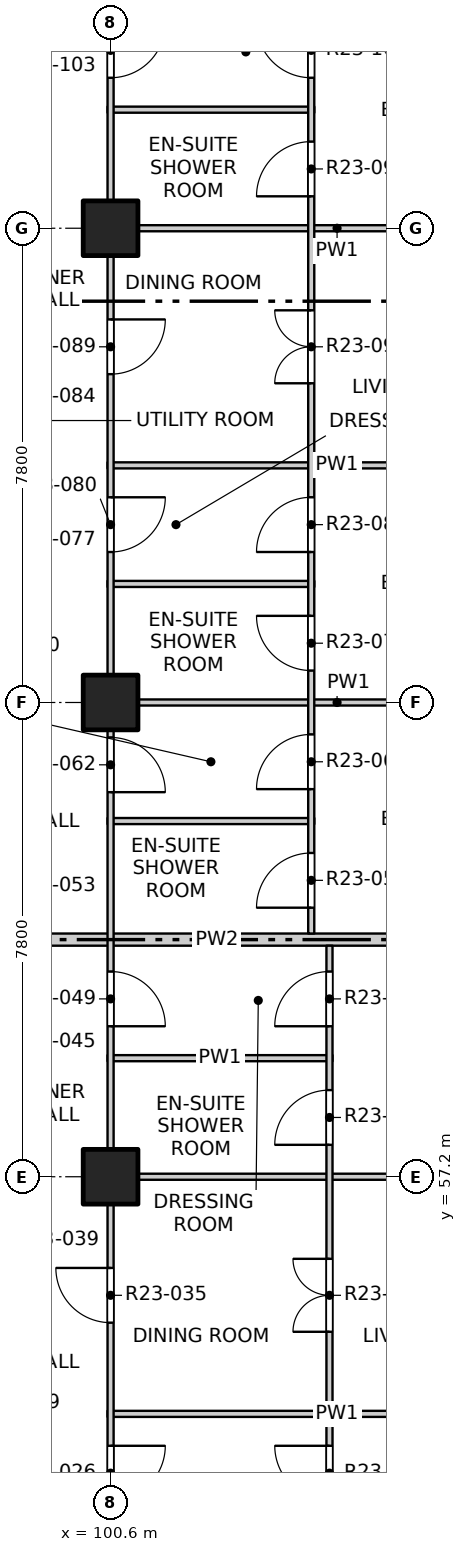
"""IFC4 building model, lengths in metres.
Left out: names, types, materials, properties, quantities, classifications, styles, units other than length and angle.
Written with IfcOpenShell. Run it as: python <this file> out.ifc"""

import sys

from ifc_helpers import new_model, si_unit, direction, frame, frame_2d, origin, origin_2d, place, context, subcontext, project, spatial, rectangle, extrude, element, fill, save


model = new_model("IFC4")
c1 = context("Model", 3, precision=1e-05, world=origin(), true_north=direction((0.0, 1.0)))
c2 = subcontext(c1, "Body", "Model", "MODEL_VIEW")
j1 = project(units=[si_unit("LENGTHUNIT", "METRE"), si_unit("PLANEANGLEUNIT", "RADIAN")], contexts=[c1])
p1 = place(None, origin())
s1 = spatial("IfcSite", under=j1, at=p1, CompositionType="ELEMENT")
p2 = place(p1, origin())
s2 = spatial("IfcBuilding", under=s1, at=p2, CompositionType="ELEMENT")
p3 = place(p2, frame((0.0, 0.0, 238.1)))
s3 = spatial("IfcBuildingStorey", under=s2, at=p3, CompositionType="ELEMENT", Elevation=238.1)
for number, where, z_axis, x_axis in (
    (1, (100.6, 57.2, -0.25), (0.0, 0.0, 1.0), (1.0, 0.0, 0.0)),
    (2, (100.6, 65.0, -0.25), (0.0, 0.0, 1.0), (1.0, 0.0, 0.0)),
    (3, (100.6, 72.8, -0.25), (0.0, 0.0, 1.0), (1.0, 0.0, 0.0)),
):
    element("IfcColumn", number, at=place(p3, frame(where, z_axis=z_axis, x_axis=x_axis)), inside=s3, PredefinedType="COLUMN", context=c2, shape_type="SweptSolid", body=[
        extrude(rectangle(XDim=0.9, YDim=0.9, at=origin_2d()), origin(), (0.0, 0.0, 1.0), 3.35),
    ])
for number, where, z_axis, x_axis in (
    (4, (100.55, 53.3, 0.0), (0.0, 0.0, 1.0), (1.0, 0.0, 0.0)),
    (5, (100.55, 57.2, 0.0), (0.0, 0.0, 1.0), (1.0, 0.0, 0.0)),
):
    element("IfcWall", number, at=place(p3, frame(where, z_axis=z_axis, x_axis=x_axis)), inside=s3, PredefinedType="PARTITIONING", context=c2, shape_type="SweptSolid", body=[
        extrude(rectangle(XDim=7.55, YDim=0.1, at=frame_2d((3.775, 0.0))), origin(), (0.0, 0.0, 1.0), 3.1),
    ])
p4 = place(p3, frame((100.55, 59.15, 0.0), z_axis=(0.0, 0.0, 1.0), x_axis=(1.0, 0.0, 0.0)))
e6 = element("IfcWall", 6, at=p4, inside=s3, PredefinedType="PARTITIONING", context=c2, shape_type="SweptSolid", body=[
    extrude(rectangle(XDim=3.7, YDim=0.1, at=frame_2d((1.85, 0.0))), origin(), (0.0, 0.0, 1.0), 3.1),
])
p5 = place(p3, frame((96.6, 61.1, 0.0), z_axis=(0.0, 0.0, 1.0), x_axis=(1.0, 0.0, 0.0)))
e7 = element("IfcWall", 7, at=p5, inside=s3, PredefinedType="PARTITIONING", context=c2, shape_type="SweptSolid", body=[
    extrude(rectangle(XDim=11.5, YDim=0.2, at=frame_2d((5.75, 0.0))), origin(), (0.0, 0.0, 1.0), 3.1),
])
p6 = place(p3, frame((100.55, 63.05, 0.0), z_axis=(0.0, 0.0, 1.0), x_axis=(1.0, 0.0, 0.0)))
e8 = element("IfcWall", 8, at=p6, inside=s3, PredefinedType="PARTITIONING", context=c2, shape_type="SweptSolid", body=[
    extrude(rectangle(XDim=3.4, YDim=0.1, at=frame_2d((1.7, 0.0))), origin(), (0.0, 0.0, 1.0), 3.1),
])
p7 = place(p3, frame((100.55, 65.0, 0.0), z_axis=(0.0, 0.0, 1.0), x_axis=(1.0, 0.0, 0.0)))
e9 = element("IfcWall", 9, at=p7, inside=s3, PredefinedType="PARTITIONING", context=c2, shape_type="SweptSolid", body=[
    extrude(rectangle(XDim=7.55, YDim=0.1, at=frame_2d((3.775, 0.0))), origin(), (0.0, 0.0, 1.0), 3.1),
])
p8 = place(p3, frame((100.55, 66.95, 0.0), z_axis=(0.0, 0.0, 1.0), x_axis=(1.0, 0.0, 0.0)))
e10 = element("IfcWall", 10, at=p8, inside=s3, PredefinedType="PARTITIONING", context=c2, shape_type="SweptSolid", body=[
    extrude(rectangle(XDim=3.4, YDim=0.1, at=frame_2d((1.7, 0.0))), origin(), (0.0, 0.0, 1.0), 3.1),
])
for number, where, z_axis, x_axis in (
    (11, (100.55, 68.9, 0.0), (0.0, 0.0, 1.0), (1.0, 0.0, 0.0)),
    (12, (100.55, 72.8, 0.0), (0.0, 0.0, 1.0), (1.0, 0.0, 0.0)),
):
    element("IfcWall", number, at=place(p3, frame(where, z_axis=z_axis, x_axis=x_axis)), inside=s3, PredefinedType="PARTITIONING", context=c2, shape_type="SweptSolid", body=[
        extrude(rectangle(XDim=7.55, YDim=0.1, at=frame_2d((3.775, 0.0))), origin(), (0.0, 0.0, 1.0), 3.1),
    ])
p9 = place(p3, frame((100.55, 74.75, 0.0), z_axis=(0.0, 0.0, 1.0), x_axis=(1.0, 0.0, 0.0)))
e13 = element("IfcWall", 13, at=p9, inside=s3, PredefinedType="PARTITIONING", context=c2, shape_type="SweptSolid", body=[
    extrude(rectangle(XDim=3.4, YDim=0.1, at=frame_2d((1.7, 0.0))), origin(), (0.0, 0.0, 1.0), 3.1),
])
p10 = place(p3, frame((100.6, 41.9, 0.0), z_axis=(0.0, 0.0, 1.0), x_axis=(0.0, 1.0, 0.0)))
e14 = element("IfcWall", 14, at=p10, inside=s3, PredefinedType="PARTITIONING", context=c2, shape_type="SweptSolid", body=[
    extrude(rectangle(XDim=46.2, YDim=0.1, at=frame_2d((23.1, 0.0))), origin(), (0.0, 0.0, 1.0), 3.1),
])
p11 = place(p10, frame((1.2, 0.0, 0.0)))
e15 = element("IfcOpeningElement", 15, at=p11, cuts=e14, PredefinedType="OPENING", context=c2, shape_type="SweptSolid", body=[
    extrude(rectangle(XDim=0.9, YDim=2.1, at=frame_2d((0.45, 1.05))), frame((0.0, 0.06, 0.0), z_axis=(0.0, -1.0, 0.0), x_axis=(1.0, 0.0, 0.0)), (0.0, 0.0, 1.0), 0.12),
])
p12 = place(p10, frame((6.025, 0.0, 0.0)))
e16 = element("IfcOpeningElement", 16, at=p12, cuts=e14, PredefinedType="OPENING", context=c2, shape_type="SweptSolid", body=[
    extrude(rectangle(XDim=0.9, YDim=2.1, at=frame_2d((0.45, 1.05))), frame((0.0, 0.06, 0.0), z_axis=(0.0, -1.0, 0.0), x_axis=(1.0, 0.0, 0.0)), (0.0, 0.0, 1.0), 0.12),
])
p13 = place(p10, frame((9.975, 0.0, 0.0)))
e17 = element("IfcOpeningElement", 17, at=p13, cuts=e14, PredefinedType="OPENING", context=c2, shape_type="SweptSolid", body=[
    extrude(rectangle(XDim=0.9, YDim=2.1, at=frame_2d((0.45, 1.05))), frame((0.0, 0.06, 0.0), z_axis=(0.0, -1.0, 0.0), x_axis=(1.0, 0.0, 0.0)), (0.0, 0.0, 1.0), 0.12),
])
p14 = place(p10, frame((12.9, 0.0, 0.0)))
e18 = element("IfcOpeningElement", 18, at=p14, cuts=e14, PredefinedType="OPENING", context=c2, shape_type="SweptSolid", body=[
    extrude(rectangle(XDim=0.9, YDim=2.1, at=frame_2d((0.45, 1.05))), frame((0.0, 0.06, 0.0), z_axis=(0.0, -1.0, 0.0), x_axis=(1.0, 0.0, 0.0)), (0.0, 0.0, 1.0), 0.12),
])
p15 = place(p10, frame((17.775, 0.0, 0.0)))
e19 = element("IfcOpeningElement", 19, at=p15, cuts=e14, PredefinedType="OPENING", context=c2, shape_type="SweptSolid", body=[
    extrude(rectangle(XDim=0.9, YDim=2.1, at=frame_2d((0.45, 1.05))), frame((0.0, 0.06, 0.0), z_axis=(0.0, -1.0, 0.0), x_axis=(1.0, 0.0, 0.0)), (0.0, 0.0, 1.0), 0.12),
])
p16 = place(p10, frame((21.625, 0.0, 0.0)))
e20 = element("IfcOpeningElement", 20, at=p16, cuts=e14, PredefinedType="OPENING", context=c2, shape_type="SweptSolid", body=[
    extrude(rectangle(XDim=0.9, YDim=2.1, at=frame_2d((0.45, 1.05))), frame((0.0, 0.06, 0.0), z_axis=(0.0, -1.0, 0.0), x_axis=(1.0, 0.0, 0.0)), (0.0, 0.0, 1.0), 0.12),
])
p17 = place(p10, frame((25.575, 0.0, 0.0)))
e21 = element("IfcOpeningElement", 21, at=p17, cuts=e14, PredefinedType="OPENING", context=c2, shape_type="SweptSolid", body=[
    extrude(rectangle(XDim=0.9, YDim=2.1, at=frame_2d((0.45, 1.05))), frame((0.0, 0.06, 0.0), z_axis=(0.0, -1.0, 0.0), x_axis=(1.0, 0.0, 0.0)), (0.0, 0.0, 1.0), 0.12),
])
p18 = place(p10, frame((28.5, 0.0, 0.0)))
e22 = element("IfcOpeningElement", 22, at=p18, cuts=e14, PredefinedType="OPENING", context=c2, shape_type="SweptSolid", body=[
    extrude(rectangle(XDim=0.9, YDim=2.1, at=frame_2d((0.45, 1.05))), frame((0.0, 0.06, 0.0), z_axis=(0.0, -1.0, 0.0), x_axis=(1.0, 0.0, 0.0)), (0.0, 0.0, 1.0), 0.12),
])
p19 = place(p10, frame((33.375, 0.0, 0.0)))
e23 = element("IfcOpeningElement", 23, at=p19, cuts=e14, PredefinedType="OPENING", context=c2, shape_type="SweptSolid", body=[
    extrude(rectangle(XDim=0.9, YDim=2.1, at=frame_2d((0.45, 1.05))), frame((0.0, 0.06, 0.0), z_axis=(0.0, -1.0, 0.0), x_axis=(1.0, 0.0, 0.0)), (0.0, 0.0, 1.0), 0.12),
])
p20 = place(p10, frame((36.3, 0.0, 0.0)))
e24 = element("IfcOpeningElement", 24, at=p20, cuts=e14, PredefinedType="OPENING", context=c2, shape_type="SweptSolid", body=[
    extrude(rectangle(XDim=0.9, YDim=2.1, at=frame_2d((0.45, 1.05))), frame((0.0, 0.06, 0.0), z_axis=(0.0, -1.0, 0.0), x_axis=(1.0, 0.0, 0.0)), (0.0, 0.0, 1.0), 0.12),
])
p21 = place(p10, frame((40.2, 0.0, 0.0)))
e25 = element("IfcOpeningElement", 25, at=p21, cuts=e14, PredefinedType="OPENING", context=c2, shape_type="SweptSolid", body=[
    extrude(rectangle(XDim=0.9, YDim=2.1, at=frame_2d((0.45, 1.05))), frame((0.0, 0.06, 0.0), z_axis=(0.0, -1.0, 0.0), x_axis=(1.0, 0.0, 0.0)), (0.0, 0.0, 1.0), 0.12),
])
p22 = place(p10, frame((44.1, 0.0, 0.0)))
e26 = element("IfcOpeningElement", 26, at=p22, cuts=e14, PredefinedType="OPENING", context=c2, shape_type="SweptSolid", body=[
    extrude(rectangle(XDim=0.9, YDim=2.1, at=frame_2d((0.45, 1.05))), frame((0.0, 0.06, 0.0), z_axis=(0.0, -1.0, 0.0), x_axis=(1.0, 0.0, 0.0)), (0.0, 0.0, 1.0), 0.12),
])
p23 = place(p3, frame((103.9, 61.2, 0.0), z_axis=(0.0, 0.0, 1.0), x_axis=(0.0, 1.0, 0.0)))
e27 = element("IfcWall", 27, at=p23, inside=s3, PredefinedType="PARTITIONING", context=c2, shape_type="SweptSolid", body=[
    extrude(rectangle(XDim=26.9, YDim=0.1, at=frame_2d((13.45, 0.0))), origin(), (0.0, 0.0, 1.0), 3.1),
])
p24 = place(p23, frame((0.425, 0.0, 0.0)))
e28 = element("IfcOpeningElement", 28, at=p24, cuts=e27, PredefinedType="OPENING", context=c2, shape_type="SweptSolid", body=[
    extrude(rectangle(XDim=0.9, YDim=2.1, at=frame_2d((0.45, 1.05))), frame((0.0, 0.06, 0.0), z_axis=(0.0, -1.0, 0.0), x_axis=(1.0, 0.0, 0.0)), (0.0, 0.0, 1.0), 0.12),
])
p25 = place(p23, frame((2.375, 0.0, 0.0)))
e29 = element("IfcOpeningElement", 29, at=p25, cuts=e27, PredefinedType="OPENING", context=c2, shape_type="SweptSolid", body=[
    extrude(rectangle(XDim=0.9, YDim=2.1, at=frame_2d((0.45, 1.05))), frame((0.0, 0.06, 0.0), z_axis=(0.0, -1.0, 0.0), x_axis=(1.0, 0.0, 0.0)), (0.0, 0.0, 1.0), 0.12),
])
p26 = place(p23, frame((4.325, 0.0, 0.0)))
e30 = element("IfcOpeningElement", 30, at=p26, cuts=e27, PredefinedType="OPENING", context=c2, shape_type="SweptSolid", body=[
    extrude(rectangle(XDim=0.9, YDim=2.1, at=frame_2d((0.45, 1.05))), frame((0.0, 0.06, 0.0), z_axis=(0.0, -1.0, 0.0), x_axis=(1.0, 0.0, 0.0)), (0.0, 0.0, 1.0), 0.12),
])
p27 = place(p23, frame((6.275, 0.0, 0.0)))
e31 = element("IfcOpeningElement", 31, at=p27, cuts=e27, PredefinedType="OPENING", context=c2, shape_type="SweptSolid", body=[
    extrude(rectangle(XDim=0.9, YDim=2.1, at=frame_2d((0.45, 1.05))), frame((0.0, 0.06, 0.0), z_axis=(0.0, -1.0, 0.0), x_axis=(1.0, 0.0, 0.0)), (0.0, 0.0, 1.0), 0.12),
])
p28 = place(p23, frame((9.05, 0.0, 0.0)))
e32 = element("IfcOpeningElement", 32, at=p28, cuts=e27, PredefinedType="OPENING", context=c2, shape_type="SweptSolid", body=[
    extrude(rectangle(XDim=1.2, YDim=2.1, at=frame_2d((0.6, 1.05))), frame((0.0, 0.06, 0.0), z_axis=(0.0, -1.0, 0.0), x_axis=(1.0, 0.0, 0.0)), (0.0, 0.0, 1.0), 0.12),
])
p29 = place(p23, frame((12.125, 0.0, 0.0)))
e33 = element("IfcOpeningElement", 33, at=p29, cuts=e27, PredefinedType="OPENING", context=c2, shape_type="SweptSolid", body=[
    extrude(rectangle(XDim=0.9, YDim=2.1, at=frame_2d((0.45, 1.05))), frame((0.0, 0.06, 0.0), z_axis=(0.0, -1.0, 0.0), x_axis=(1.0, 0.0, 0.0)), (0.0, 0.0, 1.0), 0.12),
])
p30 = place(p23, frame((14.075, 0.0, 0.0)))
e34 = element("IfcOpeningElement", 34, at=p30, cuts=e27, PredefinedType="OPENING", context=c2, shape_type="SweptSolid", body=[
    extrude(rectangle(XDim=0.9, YDim=2.1, at=frame_2d((0.45, 1.05))), frame((0.0, 0.06, 0.0), z_axis=(0.0, -1.0, 0.0), x_axis=(1.0, 0.0, 0.0)), (0.0, 0.0, 1.0), 0.12),
])
p31 = place(p23, frame((16.85, 0.0, 0.0)))
e35 = element("IfcOpeningElement", 35, at=p31, cuts=e27, PredefinedType="OPENING", context=c2, shape_type="SweptSolid", body=[
    extrude(rectangle(XDim=1.2, YDim=2.1, at=frame_2d((0.6, 1.05))), frame((0.0, 0.06, 0.0), z_axis=(0.0, -1.0, 0.0), x_axis=(1.0, 0.0, 0.0)), (0.0, 0.0, 1.0), 0.12),
])
p32 = place(p23, frame((20.75, 0.0, 0.0)))
e36 = element("IfcOpeningElement", 36, at=p32, cuts=e27, PredefinedType="OPENING", context=c2, shape_type="SweptSolid", body=[
    extrude(rectangle(XDim=1.2, YDim=2.1, at=frame_2d((0.6, 1.05))), frame((0.0, 0.06, 0.0), z_axis=(0.0, -1.0, 0.0), x_axis=(1.0, 0.0, 0.0)), (0.0, 0.0, 1.0), 0.12),
])
p33 = place(p23, frame((24.65, 0.0, 0.0)))
e37 = element("IfcOpeningElement", 37, at=p33, cuts=e27, PredefinedType="OPENING", context=c2, shape_type="SweptSolid", body=[
    extrude(rectangle(XDim=1.2, YDim=2.1, at=frame_2d((0.6, 1.05))), frame((0.0, 0.06, 0.0), z_axis=(0.0, -1.0, 0.0), x_axis=(1.0, 0.0, 0.0)), (0.0, 0.0, 1.0), 0.12),
])
p34 = place(p3, frame((104.2, 41.9, 0.0), z_axis=(0.0, 0.0, 1.0), x_axis=(0.0, 1.0, 0.0)))
e38 = element("IfcWall", 38, at=p34, inside=s3, PredefinedType="PARTITIONING", context=c2, shape_type="SweptSolid", body=[
    extrude(rectangle(XDim=19.1, YDim=0.1, at=frame_2d((9.55, 0.0))), origin(), (0.0, 0.0, 1.0), 3.1),
])
p35 = place(p34, frame((1.05, 0.0, 0.0)))
e39 = element("IfcOpeningElement", 39, at=p35, cuts=e38, PredefinedType="OPENING", context=c2, shape_type="SweptSolid", body=[
    extrude(rectangle(XDim=1.2, YDim=2.1, at=frame_2d((0.6, 1.05))), frame((0.0, 0.06, 0.0), z_axis=(0.0, -1.0, 0.0), x_axis=(1.0, 0.0, 0.0)), (0.0, 0.0, 1.0), 0.12),
])
p36 = place(p34, frame((4.125, 0.0, 0.0)))
e40 = element("IfcOpeningElement", 40, at=p36, cuts=e38, PredefinedType="OPENING", context=c2, shape_type="SweptSolid", body=[
    extrude(rectangle(XDim=0.9, YDim=2.1, at=frame_2d((0.45, 1.05))), frame((0.0, 0.06, 0.0), z_axis=(0.0, -1.0, 0.0), x_axis=(1.0, 0.0, 0.0)), (0.0, 0.0, 1.0), 0.12),
])
p37 = place(p34, frame((6.075, 0.0, 0.0)))
e41 = element("IfcOpeningElement", 41, at=p37, cuts=e38, PredefinedType="OPENING", context=c2, shape_type="SweptSolid", body=[
    extrude(rectangle(XDim=0.9, YDim=2.1, at=frame_2d((0.45, 1.05))), frame((0.0, 0.06, 0.0), z_axis=(0.0, -1.0, 0.0), x_axis=(1.0, 0.0, 0.0)), (0.0, 0.0, 1.0), 0.12),
])
p38 = place(p34, frame((8.025, 0.0, 0.0)))
e42 = element("IfcOpeningElement", 42, at=p38, cuts=e38, PredefinedType="OPENING", context=c2, shape_type="SweptSolid", body=[
    extrude(rectangle(XDim=0.9, YDim=2.1, at=frame_2d((0.45, 1.05))), frame((0.0, 0.06, 0.0), z_axis=(0.0, -1.0, 0.0), x_axis=(1.0, 0.0, 0.0)), (0.0, 0.0, 1.0), 0.12),
])
p39 = place(p34, frame((9.975, 0.0, 0.0)))
e43 = element("IfcOpeningElement", 43, at=p39, cuts=e38, PredefinedType="OPENING", context=c2, shape_type="SweptSolid", body=[
    extrude(rectangle(XDim=0.9, YDim=2.1, at=frame_2d((0.45, 1.05))), frame((0.0, 0.06, 0.0), z_axis=(0.0, -1.0, 0.0), x_axis=(1.0, 0.0, 0.0)), (0.0, 0.0, 1.0), 0.12),
])
p40 = place(p34, frame((12.75, 0.0, 0.0)))
e44 = element("IfcOpeningElement", 44, at=p40, cuts=e38, PredefinedType="OPENING", context=c2, shape_type="SweptSolid", body=[
    extrude(rectangle(XDim=1.2, YDim=2.1, at=frame_2d((0.6, 1.05))), frame((0.0, 0.06, 0.0), z_axis=(0.0, -1.0, 0.0), x_axis=(1.0, 0.0, 0.0)), (0.0, 0.0, 1.0), 0.12),
])
p41 = place(p34, frame((15.825, 0.0, 0.0)))
e45 = element("IfcOpeningElement", 45, at=p41, cuts=e38, PredefinedType="OPENING", context=c2, shape_type="SweptSolid", body=[
    extrude(rectangle(XDim=0.9, YDim=2.1, at=frame_2d((0.45, 1.05))), frame((0.0, 0.06, 0.0), z_axis=(0.0, -1.0, 0.0), x_axis=(1.0, 0.0, 0.0)), (0.0, 0.0, 1.0), 0.12),
])
p42 = place(p34, frame((17.775, 0.0, 0.0)))
e46 = element("IfcOpeningElement", 46, at=p42, cuts=e38, PredefinedType="OPENING", context=c2, shape_type="SweptSolid", body=[
    extrude(rectangle(XDim=0.9, YDim=2.1, at=frame_2d((0.45, 1.05))), frame((0.0, 0.06, 0.0), z_axis=(0.0, -1.0, 0.0), x_axis=(1.0, 0.0, 0.0)), (0.0, 0.0, 1.0), 0.12),
])
p43 = place(p13, origin())
e47 = element("IfcDoor", 47, at=p43, inside=s3, OperationType="SINGLE_SWING_LEFT", PredefinedType="DOOR", context=c2, shape_type="SweptSolid", body=[
    extrude(rectangle(XDim=0.9, YDim=2.1, at=frame_2d((0.45, 1.05))), frame((0.0, 0.025, 0.0), z_axis=(0.0, -1.0, 0.0), x_axis=(1.0, 0.0, 0.0)), (0.0, 0.0, 1.0), 0.05),
])
fill(e17, e47)
p44 = place(p39, origin())
e48 = element("IfcDoor", 48, at=p44, inside=s3, OperationType="SINGLE_SWING_RIGHT", PredefinedType="DOOR", context=c2, shape_type="SweptSolid", body=[
    extrude(rectangle(XDim=0.9, YDim=2.1, at=frame_2d((0.45, 1.05))), frame((0.0, 0.025, 0.0), z_axis=(0.0, -1.0, 0.0), x_axis=(1.0, 0.0, 0.0)), (0.0, 0.0, 1.0), 0.05),
])
fill(e43, e48)
p45 = place(p14, origin())
e49 = element("IfcDoor", 49, at=p45, inside=s3, OperationType="SINGLE_SWING_RIGHT", PredefinedType="DOOR", context=c2, shape_type="SweptSolid", body=[
    extrude(rectangle(XDim=0.9, YDim=2.1, at=frame_2d((0.45, 1.05))), frame((0.0, 0.025, 0.0), z_axis=(0.0, -1.0, 0.0), x_axis=(1.0, 0.0, 0.0)), (0.0, 0.0, 1.0), 0.05),
])
fill(e18, e49)
p46 = place(p40, origin())
e50 = element("IfcDoor", 50, at=p46, inside=s3, OperationType="DOUBLE_DOOR_SINGLE_SWING", PredefinedType="DOOR", context=c2, shape_type="SweptSolid", body=[
    extrude(rectangle(XDim=1.2, YDim=2.1, at=frame_2d((0.6, 1.05))), frame((0.0, 0.025, 0.0), z_axis=(0.0, -1.0, 0.0), x_axis=(1.0, 0.0, 0.0)), (0.0, 0.0, 1.0), 0.05),
])
fill(e44, e50)
p47 = place(p41, origin())
e51 = element("IfcDoor", 51, at=p47, inside=s3, OperationType="SINGLE_SWING_LEFT", PredefinedType="DOOR", context=c2, shape_type="SweptSolid", body=[
    extrude(rectangle(XDim=0.9, YDim=2.1, at=frame_2d((0.45, 1.05))), frame((0.0, 0.025, 0.0), z_axis=(0.0, -1.0, 0.0), x_axis=(1.0, 0.0, 0.0)), (0.0, 0.0, 1.0), 0.05),
])
fill(e45, e51)
p48 = place(p15, origin())
e52 = element("IfcDoor", 52, at=p48, inside=s3, OperationType="SINGLE_SWING_RIGHT", PredefinedType="DOOR", context=c2, shape_type="SweptSolid", body=[
    extrude(rectangle(XDim=0.9, YDim=2.1, at=frame_2d((0.45, 1.05))), frame((0.0, 0.025, 0.0), z_axis=(0.0, -1.0, 0.0), x_axis=(1.0, 0.0, 0.0)), (0.0, 0.0, 1.0), 0.05),
])
fill(e19, e52)
p49 = place(p42, origin())
e53 = element("IfcDoor", 53, at=p49, inside=s3, OperationType="SINGLE_SWING_LEFT", PredefinedType="DOOR", context=c2, shape_type="SweptSolid", body=[
    extrude(rectangle(XDim=0.9, YDim=2.1, at=frame_2d((0.45, 1.05))), frame((0.0, 0.025, 0.0), z_axis=(0.0, -1.0, 0.0), x_axis=(1.0, 0.0, 0.0)), (0.0, 0.0, 1.0), 0.05),
])
fill(e46, e53)
p50 = place(p24, origin())
e54 = element("IfcDoor", 54, at=p50, inside=s3, OperationType="SINGLE_SWING_LEFT", PredefinedType="DOOR", context=c2, shape_type="SweptSolid", body=[
    extrude(rectangle(XDim=0.9, YDim=2.1, at=frame_2d((0.45, 1.05))), frame((0.0, 0.025, 0.0), z_axis=(0.0, -1.0, 0.0), x_axis=(1.0, 0.0, 0.0)), (0.0, 0.0, 1.0), 0.05),
])
fill(e28, e54)
p51 = place(p16, origin())
e55 = element("IfcDoor", 55, at=p51, inside=s3, OperationType="SINGLE_SWING_RIGHT", PredefinedType="DOOR", context=c2, shape_type="SweptSolid", body=[
    extrude(rectangle(XDim=0.9, YDim=2.1, at=frame_2d((0.45, 1.05))), frame((0.0, 0.025, 0.0), z_axis=(0.0, -1.0, 0.0), x_axis=(1.0, 0.0, 0.0)), (0.0, 0.0, 1.0), 0.05),
])
fill(e20, e55)
p52 = place(p25, origin())
e56 = element("IfcDoor", 56, at=p52, inside=s3, OperationType="SINGLE_SWING_LEFT", PredefinedType="DOOR", context=c2, shape_type="SweptSolid", body=[
    extrude(rectangle(XDim=0.9, YDim=2.1, at=frame_2d((0.45, 1.05))), frame((0.0, 0.025, 0.0), z_axis=(0.0, -1.0, 0.0), x_axis=(1.0, 0.0, 0.0)), (0.0, 0.0, 1.0), 0.05),
])
fill(e29, e56)
p53 = place(p26, origin())
e57 = element("IfcDoor", 57, at=p53, inside=s3, OperationType="SINGLE_SWING_RIGHT", PredefinedType="DOOR", context=c2, shape_type="SweptSolid", body=[
    extrude(rectangle(XDim=0.9, YDim=2.1, at=frame_2d((0.45, 1.05))), frame((0.0, 0.025, 0.0), z_axis=(0.0, -1.0, 0.0), x_axis=(1.0, 0.0, 0.0)), (0.0, 0.0, 1.0), 0.05),
])
fill(e30, e57)
p54 = place(p17, origin())
e58 = element("IfcDoor", 58, at=p54, inside=s3, OperationType="SINGLE_SWING_LEFT", PredefinedType="DOOR", context=c2, shape_type="SweptSolid", body=[
    extrude(rectangle(XDim=0.9, YDim=2.1, at=frame_2d((0.45, 1.05))), frame((0.0, 0.025, 0.0), z_axis=(0.0, -1.0, 0.0), x_axis=(1.0, 0.0, 0.0)), (0.0, 0.0, 1.0), 0.05),
])
fill(e21, e58)
p55 = place(p27, origin())
e59 = element("IfcDoor", 59, at=p55, inside=s3, OperationType="SINGLE_SWING_LEFT", PredefinedType="DOOR", context=c2, shape_type="SweptSolid", body=[
    extrude(rectangle(XDim=0.9, YDim=2.1, at=frame_2d((0.45, 1.05))), frame((0.0, 0.025, 0.0), z_axis=(0.0, -1.0, 0.0), x_axis=(1.0, 0.0, 0.0)), (0.0, 0.0, 1.0), 0.05),
])
fill(e31, e59)
p56 = place(p18, origin())
e60 = element("IfcDoor", 60, at=p56, inside=s3, OperationType="SINGLE_SWING_LEFT", PredefinedType="DOOR", context=c2, shape_type="SweptSolid", body=[
    extrude(rectangle(XDim=0.9, YDim=2.1, at=frame_2d((0.45, 1.05))), frame((0.0, 0.025, 0.0), z_axis=(0.0, -1.0, 0.0), x_axis=(1.0, 0.0, 0.0)), (0.0, 0.0, 1.0), 0.05),
])
fill(e22, e60)
p57 = place(p28, origin())
e61 = element("IfcDoor", 61, at=p57, inside=s3, OperationType="DOUBLE_DOOR_SINGLE_SWING", PredefinedType="DOOR", context=c2, shape_type="SweptSolid", body=[
    extrude(rectangle(XDim=1.2, YDim=2.1, at=frame_2d((0.6, 1.05))), frame((0.0, 0.025, 0.0), z_axis=(0.0, -1.0, 0.0), x_axis=(1.0, 0.0, 0.0)), (0.0, 0.0, 1.0), 0.05),
])
fill(e32, e61)
p58 = place(p29, origin())
e62 = element("IfcDoor", 62, at=p58, inside=s3, OperationType="SINGLE_SWING_LEFT", PredefinedType="DOOR", context=c2, shape_type="SweptSolid", body=[
    extrude(rectangle(XDim=0.9, YDim=2.1, at=frame_2d((0.45, 1.05))), frame((0.0, 0.025, 0.0), z_axis=(0.0, -1.0, 0.0), x_axis=(1.0, 0.0, 0.0)), (0.0, 0.0, 1.0), 0.05),
])
fill(e33, e62)
p59 = place(p19, origin())
e63 = element("IfcDoor", 63, at=p59, inside=s3, OperationType="SINGLE_SWING_LEFT", PredefinedType="DOOR", context=c2, shape_type="SweptSolid", body=[
    extrude(rectangle(XDim=0.9, YDim=2.1, at=frame_2d((0.45, 1.05))), frame((0.0, 0.025, 0.0), z_axis=(0.0, -1.0, 0.0), x_axis=(1.0, 0.0, 0.0)), (0.0, 0.0, 1.0), 0.05),
])
fill(e23, e63)
p60 = place(p30, origin())
e64 = element("IfcDoor", 64, at=p60, inside=s3, OperationType="SINGLE_SWING_RIGHT", PredefinedType="DOOR", context=c2, shape_type="SweptSolid", body=[
    extrude(rectangle(XDim=0.9, YDim=2.1, at=frame_2d((0.45, 1.05))), frame((0.0, 0.025, 0.0), z_axis=(0.0, -1.0, 0.0), x_axis=(1.0, 0.0, 0.0)), (0.0, 0.0, 1.0), 0.05),
])
fill(e34, e64)
save(model, sys.argv[1])
